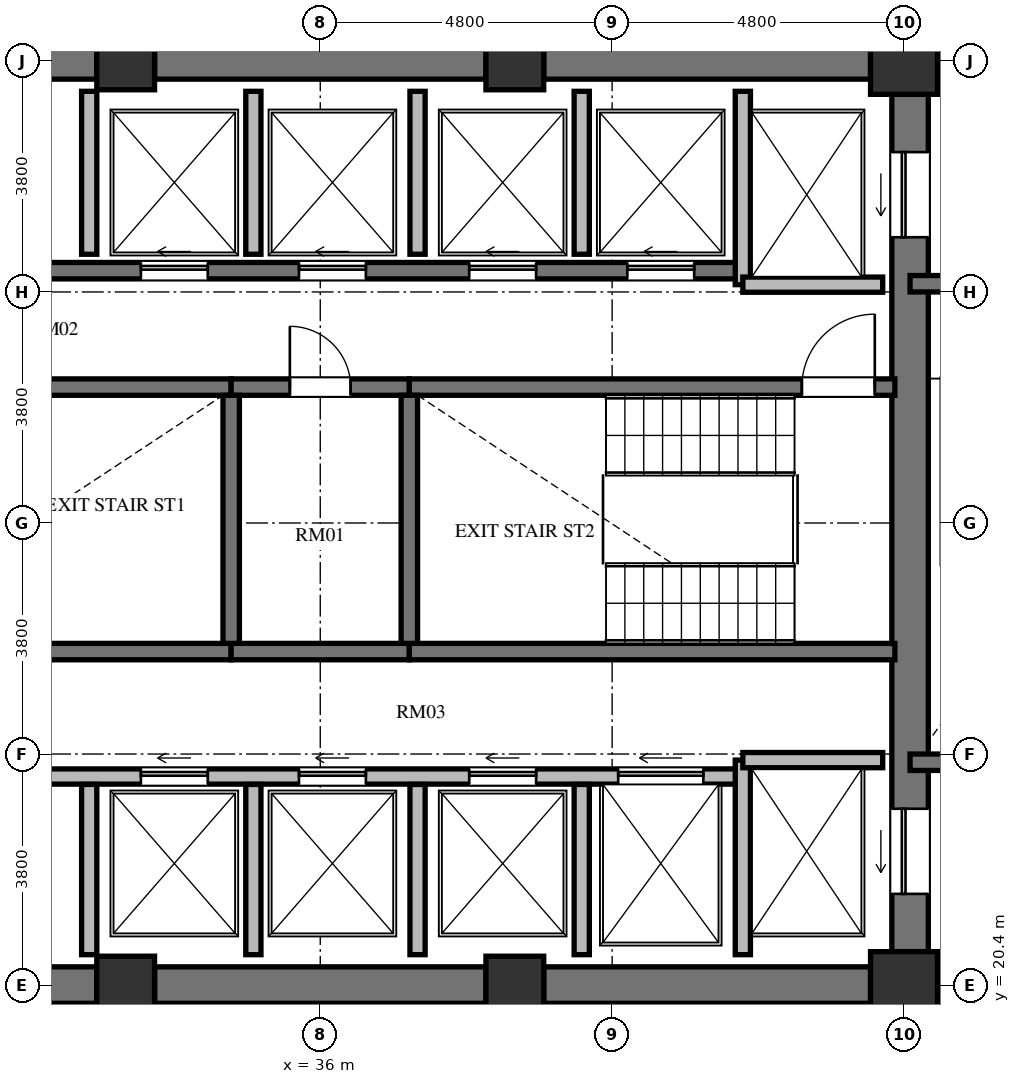
"""IFC4 building model, lengths in metres.
Left out: names, types, materials, properties, quantities, classifications, styles, units other than length and angle.
Written with IfcOpenShell. Run it as: python <this file> out.ifc"""

import sys

from ifc_helpers import new_model, si_unit, direction, frame, frame_2d, origin, origin_2d, place, context, subcontext, project, spatial, rectangle, extrude, element, fill, save


model = new_model("IFC4")
c1 = context("Model", 3, precision=1e-05, world=origin(), true_north=direction((0.0, 1.0)))
c2 = subcontext(c1, "Body", "Model", "MODEL_VIEW")
j1 = project(units=[si_unit("LENGTHUNIT", "METRE"), si_unit("PLANEANGLEUNIT", "RADIAN")], contexts=[c1])
p1 = place(None, origin())
s1 = spatial("IfcSite", under=j1, at=p1, CompositionType="ELEMENT")
p2 = place(p1, origin())
s2 = spatial("IfcBuilding", under=s1, at=p2, CompositionType="ELEMENT")
p3 = place(p2, frame((0.0, 0.0, 145.584)))
s3 = spatial("IfcBuildingStorey", under=s2, at=p3, CompositionType="ELEMENT", Elevation=145.584)
for number, where, z_axis, x_axis in (
    (1, (32.8, 20.4, 0.0), (0.0, 0.0, 1.0), (1.0, 0.0, 0.0)),
    (2, (39.2, 20.4, 0.0), (0.0, 0.0, 1.0), (1.0, 0.0, 0.0)),
):
    element("IfcColumn", number, at=place(p3, frame(where, z_axis=z_axis, x_axis=x_axis)), inside=s3, PredefinedType="COLUMN", context=c2, shape_type="SweptSolid", body=[
        extrude(rectangle(XDim=0.95, YDim=0.95, at=origin_2d()), origin(), (0.0, 0.0, 1.0), 3.648),
    ])
for number, where, z_axis, x_axis in (
    (3, (45.6, 20.4, 0.0), (0.0, 0.0, 1.0), (1.0, 0.0, 0.0)),
    (4, (45.6, 35.6, 0.0), (0.0, 0.0, 1.0), (1.0, 0.0, 0.0)),
):
    element("IfcColumn", number, at=place(p3, frame(where, z_axis=z_axis, x_axis=x_axis)), inside=s3, PredefinedType="COLUMN", context=c2, shape_type="SweptSolid", body=[
        extrude(rectangle(XDim=1.1, YDim=1.1, at=origin_2d()), origin(), (0.0, 0.0, 1.0), 3.648),
    ])
for number, where, z_axis, x_axis in (
    (5, (39.2, 35.6, 0.0), (0.0, 0.0, 1.0), (1.0, 0.0, 0.0)),
    (6, (32.8, 35.6, 0.0), (0.0, 0.0, 1.0), (1.0, 0.0, 0.0)),
):
    element("IfcColumn", number, at=place(p3, frame(where, z_axis=z_axis, x_axis=x_axis)), inside=s3, PredefinedType="COLUMN", context=c2, shape_type="SweptSolid", body=[
        extrude(rectangle(XDim=0.95, YDim=0.95, at=origin_2d()), origin(), (0.0, 0.0, 1.0), 3.648),
    ])
p4 = place(p3, frame((45.7, 20.95, 0.0), z_axis=(0.0, 0.0, 1.0), x_axis=(0.0, 1.0, 0.0)))
e7 = element("IfcWall", 7, at=p4, inside=s3, PredefinedType="SHEAR", context=c2, shape_type="SweptSolid", body=[
    extrude(rectangle(XDim=14.1, YDim=0.6, at=frame_2d((7.05, 0.0))), origin(), (0.0, 0.0, 1.0), 3.648),
])
p5 = place(p4, frame((11.75, 0.0, 0.0)))
e8 = element("IfcOpeningElement", 8, at=p5, cuts=e7, PredefinedType="OPENING", context=c2, shape_type="SweptSolid", body=[
    extrude(rectangle(XDim=1.4, YDim=2.3, at=frame_2d((0.7, 1.15))), frame((0.0, 0.31, 0.0), z_axis=(0.0, -1.0, 0.0), x_axis=(1.0, 0.0, 0.0)), (0.0, 0.0, 1.0), 0.62),
])
p6 = place(p4, frame((0.95, 0.0, 0.0)))
e9 = element("IfcOpeningElement", 9, at=p6, cuts=e7, PredefinedType="OPENING", context=c2, shape_type="SweptSolid", body=[
    extrude(rectangle(XDim=1.4, YDim=2.3, at=frame_2d((0.7, 1.15))), frame((0.0, 0.31, 0.0), z_axis=(0.0, -1.0, 0.0), x_axis=(1.0, 0.0, 0.0)), (0.0, 0.0, 1.0), 0.62),
])
for number, where, z_axis, x_axis in (
    (10, (26.95, 20.4, 0.0), (0.0, 0.0, 1.0), (1.0, 0.0, 0.0)),
    (11, (26.95, 35.6, 0.0), (0.0, 0.0, 1.0), (1.0, 0.0, 0.0)),
):
    element("IfcWall", number, at=place(p3, frame(where, z_axis=z_axis, x_axis=x_axis)), inside=s3, PredefinedType="SHEAR", context=c2, shape_type="SweptSolid", body=[
        extrude(rectangle(XDim=5.375, YDim=0.6, at=frame_2d((2.688, 0.0))), origin(), (0.0, 0.0, 1.0), 3.648),
    ])
for number, where, z_axis, x_axis in (
    (12, (33.275, 20.4, 0.0), (0.0, 0.0, 1.0), (1.0, 0.0, 0.0)),
    (13, (33.275, 35.6, 0.0), (0.0, 0.0, 1.0), (1.0, 0.0, 0.0)),
):
    element("IfcWall", number, at=place(p3, frame(where, z_axis=z_axis, x_axis=x_axis)), inside=s3, PredefinedType="SHEAR", context=c2, shape_type="SweptSolid", body=[
        extrude(rectangle(XDim=5.45, YDim=0.6, at=frame_2d((2.725, 0.0))), origin(), (0.0, 0.0, 1.0), 3.648),
    ])
for number, where, z_axis, x_axis in (
    (14, (39.675, 20.4, 0.0), (0.0, 0.0, 1.0), (1.0, 0.0, 0.0)),
    (15, (39.675, 35.6, 0.0), (0.0, 0.0, 1.0), (1.0, 0.0, 0.0)),
):
    element("IfcWall", number, at=place(p3, frame(where, z_axis=z_axis, x_axis=x_axis)), inside=s3, PredefinedType="SHEAR", context=c2, shape_type="SweptSolid", body=[
        extrude(rectangle(XDim=5.375, YDim=0.6, at=frame_2d((2.688, 0.0))), origin(), (0.0, 0.0, 1.0), 3.648),
    ])
p7 = place(p3, frame((26.55, 30.235, 0.0), z_axis=(0.0, 0.0, 1.0), x_axis=(1.0, 0.0, 0.0)))
e16 = element("IfcWall", 16, at=p7, inside=s3, PredefinedType="SHEAR", context=c2, shape_type="SweptSolid", body=[
    extrude(rectangle(XDim=7.985, YDim=0.27, at=frame_2d((3.992, 0.0))), origin(), (0.0, 0.0, 1.0), 3.648),
])
p8 = place(p3, frame((34.535, 30.235, 0.0), z_axis=(0.0, 0.0, 1.0), x_axis=(1.0, 0.0, 0.0)))
e17 = element("IfcWall", 17, at=p8, inside=s3, PredefinedType="SHEAR", context=c2, shape_type="SweptSolid", body=[
    extrude(rectangle(XDim=2.93, YDim=0.27, at=frame_2d((1.465, 0.0))), origin(), (0.0, 0.0, 1.0), 3.648),
])
p9 = place(p8, frame((0.965, 0.0, 0.0)))
e18 = element("IfcOpeningElement", 18, at=p9, cuts=e17, PredefinedType="OPENING", context=c2, shape_type="SweptSolid", body=[
    extrude(rectangle(XDim=1.0, YDim=2.1, at=frame_2d((0.5, 1.05))), frame((0.0, 0.145, 0.0), z_axis=(0.0, -1.0, 0.0), x_axis=(1.0, 0.0, 0.0)), (0.0, 0.0, 1.0), 0.29),
])
p10 = place(p3, frame((37.465, 30.235, 0.0), z_axis=(0.0, 0.0, 1.0), x_axis=(1.0, 0.0, 0.0)))
e19 = element("IfcWall", 19, at=p10, inside=s3, PredefinedType="SHEAR", context=c2, shape_type="SweptSolid", body=[
    extrude(rectangle(XDim=7.985, YDim=0.27, at=frame_2d((3.992, 0.0))), origin(), (0.0, 0.0, 1.0), 3.648),
])
p11 = place(p10, frame((6.455, 0.0, 0.0)))
e20 = element("IfcOpeningElement", 20, at=p11, cuts=e19, PredefinedType="OPENING", context=c2, shape_type="SweptSolid", body=[
    extrude(rectangle(XDim=1.2, YDim=2.15, at=frame_2d((0.6, 1.075))), frame((0.0, 0.145, 0.0), z_axis=(0.0, -1.0, 0.0), x_axis=(1.0, 0.0, 0.0)), (0.0, 0.0, 1.0), 0.29),
])
p12 = place(p3, frame((26.55, 25.885, 0.0), z_axis=(0.0, 0.0, 1.0), x_axis=(1.0, 0.0, 0.0)))
e21 = element("IfcWall", 21, at=p12, inside=s3, PredefinedType="SHEAR", context=c2, shape_type="SweptSolid", body=[
    extrude(rectangle(XDim=7.985, YDim=0.27, at=frame_2d((3.992, 0.0))), origin(), (0.0, 0.0, 1.0), 3.648),
])
p13 = place(p3, frame((34.535, 25.885, 0.0), z_axis=(0.0, 0.0, 1.0), x_axis=(1.0, 0.0, 0.0)))
e22 = element("IfcWall", 22, at=p13, inside=s3, PredefinedType="SHEAR", context=c2, shape_type="SweptSolid", body=[
    extrude(rectangle(XDim=2.93, YDim=0.27, at=frame_2d((1.465, 0.0))), origin(), (0.0, 0.0, 1.0), 3.648),
])
p14 = place(p3, frame((37.465, 25.885, 0.0), z_axis=(0.0, 0.0, 1.0), x_axis=(1.0, 0.0, 0.0)))
e23 = element("IfcWall", 23, at=p14, inside=s3, PredefinedType="SHEAR", context=c2, shape_type="SweptSolid", body=[
    extrude(rectangle(XDim=7.985, YDim=0.27, at=frame_2d((3.992, 0.0))), origin(), (0.0, 0.0, 1.0), 3.648),
])
for number, where, z_axis, x_axis in (
    (24, (34.535, 26.02, 0.0), (0.0, 0.0, 1.0), (0.0, 1.0, 0.0)),
    (25, (37.465, 26.02, 0.0), (0.0, 0.0, 1.0), (0.0, 1.0, 0.0)),
):
    element("IfcWall", number, at=place(p3, frame(where, z_axis=z_axis, x_axis=x_axis)), inside=s3, PredefinedType="SHEAR", context=c2, shape_type="SweptSolid", body=[
        extrude(rectangle(XDim=4.08, YDim=0.27, at=frame_2d((2.04, 0.0))), origin(), (0.0, 0.0, 1.0), 3.648),
    ])
p15 = place(p3, frame((26.55, 32.15, 0.0), z_axis=(0.0, 0.0, 1.0), x_axis=(1.0, 0.0, 0.0)))
e26 = element("IfcWall", 26, at=p15, inside=s3, PredefinedType="SHEAR", context=c2, shape_type="SweptSolid", body=[
    extrude(rectangle(XDim=16.4, YDim=0.27, at=frame_2d((8.2, 0.0))), origin(), (0.0, 0.0, 1.0), 3.648),
])
p16 = place(p15, frame((2.425, 0.0, 0.0)))
e27 = element("IfcOpeningElement", 27, at=p16, cuts=e26, PredefinedType="OPENING", context=c2, shape_type="SweptSolid", body=[
    extrude(rectangle(XDim=1.05, YDim=2.15, at=frame_2d((0.525, 1.075))), frame((0.0, 0.145, 0.0), z_axis=(0.0, -1.0, 0.0), x_axis=(1.0, 0.0, 0.0)), (0.0, 0.0, 1.0), 0.29),
])
p17 = place(p15, frame((6.5, 0.0, 0.0)))
e28 = element("IfcOpeningElement", 28, at=p17, cuts=e26, PredefinedType="OPENING", context=c2, shape_type="SweptSolid", body=[
    extrude(rectangle(XDim=1.1, YDim=2.2, at=frame_2d((0.55, 1.1))), frame((0.0, 0.145, 0.0), z_axis=(0.0, -1.0, 0.0), x_axis=(1.0, 0.0, 0.0)), (0.0, 0.0, 1.0), 0.29),
])
p18 = place(p15, frame((9.1, 0.0, 0.0)))
e29 = element("IfcOpeningElement", 29, at=p18, cuts=e26, PredefinedType="OPENING", context=c2, shape_type="SweptSolid", body=[
    extrude(rectangle(XDim=1.1, YDim=2.2, at=frame_2d((0.55, 1.1))), frame((0.0, 0.145, 0.0), z_axis=(0.0, -1.0, 0.0), x_axis=(1.0, 0.0, 0.0)), (0.0, 0.0, 1.0), 0.29),
])
p19 = place(p15, frame((11.9, 0.0, 0.0)))
e30 = element("IfcOpeningElement", 30, at=p19, cuts=e26, PredefinedType="OPENING", context=c2, shape_type="SweptSolid", body=[
    extrude(rectangle(XDim=1.1, YDim=2.2, at=frame_2d((0.55, 1.1))), frame((0.0, 0.145, 0.0), z_axis=(0.0, -1.0, 0.0), x_axis=(1.0, 0.0, 0.0)), (0.0, 0.0, 1.0), 0.29),
])
p20 = place(p15, frame((14.5, 0.0, 0.0)))
e31 = element("IfcOpeningElement", 31, at=p20, cuts=e26, PredefinedType="OPENING", context=c2, shape_type="SweptSolid", body=[
    extrude(rectangle(XDim=1.1, YDim=2.2, at=frame_2d((0.55, 1.1))), frame((0.0, 0.145, 0.0), z_axis=(0.0, -1.0, 0.0), x_axis=(1.0, 0.0, 0.0)), (0.0, 0.0, 1.0), 0.29),
])
p21 = place(p3, frame((26.75, 23.83, 0.0), z_axis=(0.0, 0.0, 1.0), x_axis=(1.0, 0.0, 0.0)))
e32 = element("IfcWall", 32, at=p21, inside=s3, PredefinedType="SOLIDWALL", context=c2, shape_type="SweptSolid", body=[
    extrude(rectangle(XDim=16.2, YDim=0.25, at=frame_2d((8.1, 0.0))), origin(), (0.0, 0.0, 1.0), 3.428),
])
p22 = place(p21, frame((2.225, 0.0, 0.0)))
e33 = element("IfcOpeningElement", 33, at=p22, cuts=e32, PredefinedType="OPENING", context=c2, shape_type="SweptSolid", body=[
    extrude(rectangle(XDim=1.05, YDim=2.15, at=frame_2d((0.525, 1.075))), frame((0.0, 0.135, 0.0), z_axis=(0.0, -1.0, 0.0), x_axis=(1.0, 0.0, 0.0)), (0.0, 0.0, 1.0), 0.27),
])
p23 = place(p21, frame((6.3, 0.0, 0.0)))
e34 = element("IfcOpeningElement", 34, at=p23, cuts=e32, PredefinedType="OPENING", context=c2, shape_type="SweptSolid", body=[
    extrude(rectangle(XDim=1.1, YDim=2.2, at=frame_2d((0.55, 1.1))), frame((0.0, 0.135, 0.0), z_axis=(0.0, -1.0, 0.0), x_axis=(1.0, 0.0, 0.0)), (0.0, 0.0, 1.0), 0.27),
])
p24 = place(p21, frame((8.9, 0.0, 0.0)))
e35 = element("IfcOpeningElement", 35, at=p24, cuts=e32, PredefinedType="OPENING", context=c2, shape_type="SweptSolid", body=[
    extrude(rectangle(XDim=1.1, YDim=2.2, at=frame_2d((0.55, 1.1))), frame((0.0, 0.135, 0.0), z_axis=(0.0, -1.0, 0.0), x_axis=(1.0, 0.0, 0.0)), (0.0, 0.0, 1.0), 0.27),
])
p25 = place(p21, frame((11.7, 0.0, 0.0)))
e36 = element("IfcOpeningElement", 36, at=p25, cuts=e32, PredefinedType="OPENING", context=c2, shape_type="SweptSolid", body=[
    extrude(rectangle(XDim=1.1, YDim=2.2, at=frame_2d((0.55, 1.1))), frame((0.0, 0.135, 0.0), z_axis=(0.0, -1.0, 0.0), x_axis=(1.0, 0.0, 0.0)), (0.0, 0.0, 1.0), 0.27),
])
p26 = place(p21, frame((14.15, 0.0, 0.0)))
e37 = element("IfcOpeningElement", 37, at=p26, cuts=e32, PredefinedType="OPENING", context=c2, shape_type="SweptSolid", body=[
    extrude(rectangle(XDim=1.4, YDim=2.3, at=frame_2d((0.7, 1.15))), frame((0.0, 0.135, 0.0), z_axis=(0.0, -1.0, 0.0), x_axis=(1.0, 0.0, 0.0)), (0.0, 0.0, 1.0), 0.27),
])
p27 = place(p3, frame((42.95, 31.92, 0.0), z_axis=(0.0, 0.0, 1.0), x_axis=(0.0, 1.0, 0.0)))
e38 = element("IfcWall", 38, at=p27, inside=s3, PredefinedType="SOLIDWALL", context=c2, shape_type="SweptSolid", body=[
    extrude(rectangle(XDim=3.18, YDim=0.25, at=frame_2d((1.59, 0.0))), origin(), (0.0, 0.0, 1.0), 3.428),
])
p28 = place(p3, frame((42.95, 31.92, 0.0), z_axis=(0.0, 0.0, 1.0), x_axis=(1.0, 0.0, 0.0)))
e39 = element("IfcWall", 39, at=p28, inside=s3, PredefinedType="SOLIDWALL", context=c2, shape_type="SweptSolid", body=[
    extrude(rectangle(XDim=2.3, YDim=0.25, at=frame_2d((1.15, 0.0))), origin(), (0.0, 0.0, 1.0), 3.428),
])
p29 = place(p3, frame((42.95, 20.9, 0.0), z_axis=(0.0, 0.0, 1.0), x_axis=(0.0, 1.0, 0.0)))
e40 = element("IfcWall", 40, at=p29, inside=s3, PredefinedType="SOLIDWALL", context=c2, shape_type="SweptSolid", body=[
    extrude(rectangle(XDim=3.2, YDim=0.25, at=frame_2d((1.6, 0.0))), origin(), (0.0, 0.0, 1.0), 3.428),
])
p30 = place(p3, frame((42.95, 24.1, 0.0), z_axis=(0.0, 0.0, 1.0), x_axis=(1.0, 0.0, 0.0)))
e41 = element("IfcWall", 41, at=p30, inside=s3, PredefinedType="SOLIDWALL", context=c2, shape_type="SweptSolid", body=[
    extrude(rectangle(XDim=2.3, YDim=0.25, at=frame_2d((1.15, 0.0))), origin(), (0.0, 0.0, 1.0), 3.428),
])
p31 = place(p3, frame((32.2, 32.42, 0.0), z_axis=(0.0, 0.0, 1.0), x_axis=(0.0, 1.0, 0.0)))
e42 = element("IfcWall", 42, at=p31, inside=s3, PredefinedType="SOLIDWALL", context=c2, shape_type="SweptSolid", body=[
    extrude(rectangle(XDim=2.68, YDim=0.25, at=frame_2d((1.34, 0.0))), origin(), (0.0, 0.0, 1.0), 3.428),
])
p32 = place(p3, frame((32.2, 20.9, 0.0), z_axis=(0.0, 0.0, 1.0), x_axis=(0.0, 1.0, 0.0)))
e43 = element("IfcWall", 43, at=p32, inside=s3, PredefinedType="SOLIDWALL", context=c2, shape_type="SweptSolid", body=[
    extrude(rectangle(XDim=2.8, YDim=0.25, at=frame_2d((1.4, 0.0))), origin(), (0.0, 0.0, 1.0), 3.428),
])
p33 = place(p3, frame((34.9, 32.42, 0.0), z_axis=(0.0, 0.0, 1.0), x_axis=(0.0, 1.0, 0.0)))
e44 = element("IfcWall", 44, at=p33, inside=s3, PredefinedType="SOLIDWALL", context=c2, shape_type="SweptSolid", body=[
    extrude(rectangle(XDim=2.68, YDim=0.25, at=frame_2d((1.34, 0.0))), origin(), (0.0, 0.0, 1.0), 3.428),
])
p34 = place(p3, frame((34.9, 20.9, 0.0), z_axis=(0.0, 0.0, 1.0), x_axis=(0.0, 1.0, 0.0)))
e45 = element("IfcWall", 45, at=p34, inside=s3, PredefinedType="SOLIDWALL", context=c2, shape_type="SweptSolid", body=[
    extrude(rectangle(XDim=2.8, YDim=0.25, at=frame_2d((1.4, 0.0))), origin(), (0.0, 0.0, 1.0), 3.428),
])
p35 = place(p3, frame((37.6, 32.42, 0.0), z_axis=(0.0, 0.0, 1.0), x_axis=(0.0, 1.0, 0.0)))
e46 = element("IfcWall", 46, at=p35, inside=s3, PredefinedType="SOLIDWALL", context=c2, shape_type="SweptSolid", body=[
    extrude(rectangle(XDim=2.68, YDim=0.25, at=frame_2d((1.34, 0.0))), origin(), (0.0, 0.0, 1.0), 3.428),
])
p36 = place(p3, frame((37.6, 20.9, 0.0), z_axis=(0.0, 0.0, 1.0), x_axis=(0.0, 1.0, 0.0)))
e47 = element("IfcWall", 47, at=p36, inside=s3, PredefinedType="SOLIDWALL", context=c2, shape_type="SweptSolid", body=[
    extrude(rectangle(XDim=2.8, YDim=0.25, at=frame_2d((1.4, 0.0))), origin(), (0.0, 0.0, 1.0), 3.428),
])
p37 = place(p3, frame((40.3, 32.42, 0.0), z_axis=(0.0, 0.0, 1.0), x_axis=(0.0, 1.0, 0.0)))
e48 = element("IfcWall", 48, at=p37, inside=s3, PredefinedType="SOLIDWALL", context=c2, shape_type="SweptSolid", body=[
    extrude(rectangle(XDim=2.68, YDim=0.25, at=frame_2d((1.34, 0.0))), origin(), (0.0, 0.0, 1.0), 3.428),
])
p38 = place(p3, frame((40.3, 20.9, 0.0), z_axis=(0.0, 0.0, 1.0), x_axis=(0.0, 1.0, 0.0)))
e49 = element("IfcWall", 49, at=p38, inside=s3, PredefinedType="SOLIDWALL", context=c2, shape_type="SweptSolid", body=[
    extrude(rectangle(XDim=2.8, YDim=0.25, at=frame_2d((1.4, 0.0))), origin(), (0.0, 0.0, 1.0), 3.428),
])
for number, where, z_axis, x_axis in (
    (50, (45.7, 31.935, 0.0), (0.0, 0.0, 1.0), (1.0, 0.0, 0.0)),
    (51, (45.7, 24.065, 0.0), (0.0, 0.0, 1.0), (1.0, 0.0, 0.0)),
):
    element("IfcWall", number, at=place(p3, frame(where, z_axis=z_axis, x_axis=x_axis)), inside=s3, PredefinedType="SHEAR", context=c2, shape_type="SweptSolid", body=[
        extrude(rectangle(XDim=4.715, YDim=0.27, at=frame_2d((2.357, 0.0))), origin(), (0.0, 0.0, 1.0), 3.648),
    ])
p39 = place(p3, frame((45.7, 20.02, 0.0), z_axis=(0.0, 0.0, 1.0), x_axis=(1.0, 0.0, 0.0)))
e52 = element("IfcWall", 52, at=p39, inside=s3, PredefinedType="SOLIDWALL", context=c2, shape_type="SweptSolid", body=[
    extrude(rectangle(XDim=4.715, YDim=0.25, at=frame_2d((2.357, 0.0))), origin(), (0.0, 0.0, 1.0), 3.428),
])
p40 = place(p11, origin())
e53 = element("IfcDoor", 53, at=p40, inside=s3, OperationType="SINGLE_SWING_RIGHT", PredefinedType="DOOR", context=c2, shape_type="SweptSolid", body=[
    extrude(rectangle(XDim=1.2, YDim=2.15, at=frame_2d((0.6, 1.075))), frame((0.0, 0.025, 0.0), z_axis=(0.0, -1.0, 0.0), x_axis=(1.0, 0.0, 0.0)), (0.0, 0.0, 1.0), 0.05),
])
fill(e20, e53)
p41 = place(p9, origin())
e54 = element("IfcDoor", 54, at=p41, inside=s3, OperationType="SINGLE_SWING_LEFT", PredefinedType="DOOR", context=c2, shape_type="SweptSolid", body=[
    extrude(rectangle(XDim=1.0, YDim=2.1, at=frame_2d((0.5, 1.05))), frame((0.0, 0.025, 0.0), z_axis=(0.0, -1.0, 0.0), x_axis=(1.0, 0.0, 0.0)), (0.0, 0.0, 1.0), 0.05),
])
fill(e18, e54)
p42 = place(p17, origin())
e55 = element("IfcDoor", 55, at=p42, inside=s3, OperationType="SLIDING_TO_LEFT", PredefinedType="DOOR", context=c2, shape_type="SweptSolid", body=[
    extrude(rectangle(XDim=1.1, YDim=2.2, at=frame_2d((0.55, 1.1))), frame((0.0, 0.025, 0.0), z_axis=(0.0, -1.0, 0.0), x_axis=(1.0, 0.0, 0.0)), (0.0, 0.0, 1.0), 0.05),
])
fill(e28, e55)
p43 = place(p18, origin())
e56 = element("IfcDoor", 56, at=p43, inside=s3, OperationType="SLIDING_TO_LEFT", PredefinedType="DOOR", context=c2, shape_type="SweptSolid", body=[
    extrude(rectangle(XDim=1.1, YDim=2.2, at=frame_2d((0.55, 1.1))), frame((0.0, 0.025, 0.0), z_axis=(0.0, -1.0, 0.0), x_axis=(1.0, 0.0, 0.0)), (0.0, 0.0, 1.0), 0.05),
])
fill(e29, e56)
p44 = place(p23, origin())
e57 = element("IfcDoor", 57, at=p44, inside=s3, OperationType="SLIDING_TO_LEFT", PredefinedType="DOOR", context=c2, shape_type="SweptSolid", body=[
    extrude(rectangle(XDim=1.1, YDim=2.2, at=frame_2d((0.55, 1.1))), frame((0.0, 0.025, 0.0), z_axis=(0.0, -1.0, 0.0), x_axis=(1.0, 0.0, 0.0)), (0.0, 0.0, 1.0), 0.05),
])
fill(e34, e57)
p45 = place(p24, origin())
e58 = element("IfcDoor", 58, at=p45, inside=s3, OperationType="SLIDING_TO_LEFT", PredefinedType="DOOR", context=c2, shape_type="SweptSolid", body=[
    extrude(rectangle(XDim=1.1, YDim=2.2, at=frame_2d((0.55, 1.1))), frame((0.0, 0.025, 0.0), z_axis=(0.0, -1.0, 0.0), x_axis=(1.0, 0.0, 0.0)), (0.0, 0.0, 1.0), 0.05),
])
fill(e35, e58)
p46 = place(p19, origin())
e59 = element("IfcDoor", 59, at=p46, inside=s3, OperationType="SLIDING_TO_LEFT", PredefinedType="DOOR", context=c2, shape_type="SweptSolid", body=[
    extrude(rectangle(XDim=1.1, YDim=2.2, at=frame_2d((0.55, 1.1))), frame((0.0, 0.025, 0.0), z_axis=(0.0, -1.0, 0.0), x_axis=(1.0, 0.0, 0.0)), (0.0, 0.0, 1.0), 0.05),
])
fill(e30, e59)
p47 = place(p20, origin())
e60 = element("IfcDoor", 60, at=p47, inside=s3, OperationType="SLIDING_TO_LEFT", PredefinedType="DOOR", context=c2, shape_type="SweptSolid", body=[
    extrude(rectangle(XDim=1.1, YDim=2.2, at=frame_2d((0.55, 1.1))), frame((0.0, 0.025, 0.0), z_axis=(0.0, -1.0, 0.0), x_axis=(1.0, 0.0, 0.0)), (0.0, 0.0, 1.0), 0.05),
])
fill(e31, e60)
p48 = place(p25, origin())
e61 = element("IfcDoor", 61, at=p48, inside=s3, OperationType="SLIDING_TO_LEFT", PredefinedType="DOOR", context=c2, shape_type="SweptSolid", body=[
    extrude(rectangle(XDim=1.1, YDim=2.2, at=frame_2d((0.55, 1.1))), frame((0.0, 0.025, 0.0), z_axis=(0.0, -1.0, 0.0), x_axis=(1.0, 0.0, 0.0)), (0.0, 0.0, 1.0), 0.05),
])
fill(e36, e61)
p49 = place(p5, origin())
e62 = element("IfcDoor", 62, at=p49, inside=s3, OperationType="SLIDING_TO_LEFT", PredefinedType="DOOR", context=c2, shape_type="SweptSolid", body=[
    extrude(rectangle(XDim=1.4, YDim=2.3, at=frame_2d((0.7, 1.15))), frame((0.0, 0.025, 0.0), z_axis=(0.0, -1.0, 0.0), x_axis=(1.0, 0.0, 0.0)), (0.0, 0.0, 1.0), 0.05),
])
fill(e8, e62)
p50 = place(p6, origin())
e63 = element("IfcDoor", 63, at=p50, inside=s3, OperationType="SLIDING_TO_LEFT", PredefinedType="DOOR", context=c2, shape_type="SweptSolid", body=[
    extrude(rectangle(XDim=1.4, YDim=2.3, at=frame_2d((0.7, 1.15))), frame((0.0, 0.025, 0.0), z_axis=(0.0, -1.0, 0.0), x_axis=(1.0, 0.0, 0.0)), (0.0, 0.0, 1.0), 0.05),
])
fill(e9, e63)
p51 = place(p26, origin())
e64 = element("IfcDoor", 64, at=p51, inside=s3, OperationType="SLIDING_TO_LEFT", PredefinedType="DOOR", context=c2, shape_type="SweptSolid", body=[
    extrude(rectangle(XDim=1.4, YDim=2.3, at=frame_2d((0.7, 1.15))), frame((0.0, 0.025, 0.0), z_axis=(0.0, -1.0, 0.0), x_axis=(1.0, 0.0, 0.0)), (0.0, 0.0, 1.0), 0.05),
])
fill(e37, e64)
save(model, sys.argv[1])
